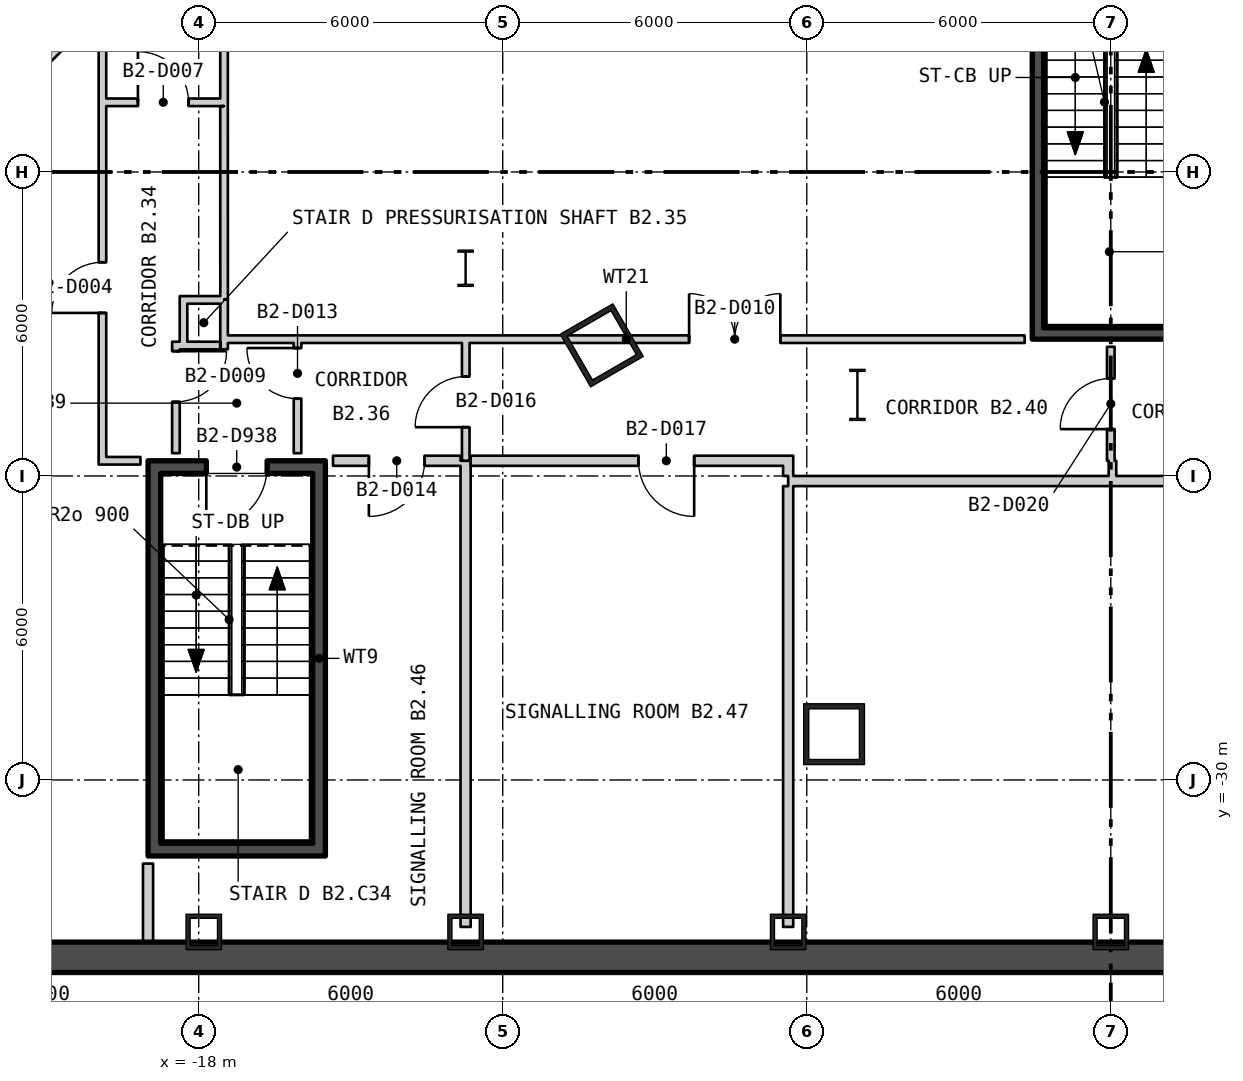
"""IFC4 building model, lengths in metres.
Left out: names, types, materials, properties, quantities, classifications, styles, units other than length and angle.
Written with IfcOpenShell. Run it as: python <this file> out.ifc"""

import sys

from ifc_helpers import new_model, si_unit, direction, frame, frame_2d, origin, origin_2d, place, context, subcontext, project, spatial, rectangle, hollow_rectangle, i_section, extrude, element, fill, save


model = new_model("IFC4")
c1 = context("Model", 3, precision=1e-05, world=origin(), true_north=direction((0.0, 1.0)))
c2 = subcontext(c1, "Body", "Model", "MODEL_VIEW")
j1 = project(units=[si_unit("LENGTHUNIT", "METRE"), si_unit("PLANEANGLEUNIT", "RADIAN")], contexts=[c1])
p1 = place(None, origin())
s1 = spatial("IfcSite", under=j1, at=p1, CompositionType="ELEMENT")
p2 = place(p1, origin())
s2 = spatial("IfcBuilding", under=s1, at=p2, CompositionType="ELEMENT")
p3 = place(p2, frame((0.0, 0.0, -11.4)))
s3 = spatial("IfcBuildingStorey", under=s2, at=p3, CompositionType="ELEMENT", Elevation=-11.4)
for number, where, z_axis, x_axis in (
    (1, (-10.046, -21.422, 0.0), (0.0, 0.0, 1.0), (0.5, -0.866, 0.0)),
    (2, (-5.461, -29.096, 0.0), (0.0, 0.0, 1.0), (1.0, 0.0, 0.0)),
):
    element("IfcColumn", number, at=place(p3, frame(where, z_axis=z_axis, x_axis=x_axis)), inside=s3, PredefinedType="COLUMN", context=c2, shape_type="SweptSolid", body=[
        extrude(hollow_rectangle(XDim=1.2, YDim=1.2, WallThickness=0.1, at=origin_2d()), origin(), (0.0, 0.0, 1.0), 5.7),
    ])
p4 = place(p3, frame((-5.0, -22.4, 0.0), z_axis=(0.0, 0.0, 1.0), x_axis=(1.0, 0.0, 0.0)))
e3 = element("IfcColumn", 3, at=p4, inside=s3, PredefinedType="COLUMN", context=c2, shape_type="SweptSolid", body=[
    extrude(i_section(OverallWidth=0.302, OverallDepth=1.008, WebThickness=0.021, FlangeThickness=0.04, at=origin_2d()), origin(), (0.0, 0.0, 1.0), 5.7),
])
for number, where, z_axis, x_axis in (
    (4, (-17.9, -33.0, 0.0), (0.0, 0.0, 1.0), (1.0, 0.0, 0.0)),
    (5, (-12.733, -33.0, 0.0), (0.0, 0.0, 1.0), (1.0, 0.0, 0.0)),
    (6, (-6.367, -33.0, 0.0), (0.0, 0.0, 1.0), (1.0, 0.0, 0.0)),
    (7, (0.0, -33.0, 0.0), (0.0, 0.0, 1.0), (1.0, 0.0, 0.0)),
):
    element("IfcColumn", number, at=place(p3, frame(where, z_axis=z_axis, x_axis=x_axis)), inside=s3, PredefinedType="COLUMN", context=c2, shape_type="SweptSolid", body=[
        extrude(hollow_rectangle(XDim=0.7, YDim=0.7, WallThickness=0.08, at=origin_2d()), origin(), (0.0, 0.0, 1.0), 5.7),
    ])
p5 = place(p3, frame((-12.733, -19.9, 0.0), z_axis=(0.0, 0.0, 1.0), x_axis=(1.0, 0.0, 0.0)))
e8 = element("IfcColumn", 8, at=p5, inside=s3, PredefinedType="COLUMN", context=c2, shape_type="SweptSolid", body=[
    extrude(i_section(OverallWidth=0.304, OverallDepth=0.716, WebThickness=0.021, FlangeThickness=0.04, at=origin_2d()), origin(), (0.0, 0.0, 1.0), 5.7),
])
p6 = place(p3, frame((-39.0, -33.5, -0.4), z_axis=(0.0, 0.0, 1.0), x_axis=(1.0, 0.0, 0.0)))
e9 = element("IfcWall", 9, at=p6, inside=s3, PredefinedType="STANDARD", context=c2, shape_type="SweptSolid", body=[
    extrude(rectangle(XDim=78.0, YDim=0.6, at=frame_2d((39.0, 0.0))), origin(), (0.0, 0.0, 1.0), 5.7),
])
p7 = place(p3, frame((-1.438, -21.075, 0.0), z_axis=(0.0, 0.0, 1.0), x_axis=(0.0, 1.0, 0.0)))
e10 = element("IfcWall", 10, at=p7, inside=s3, PredefinedType="SHEAR", context=c2, shape_type="SweptSolid", body=[
    extrude(rectangle(XDim=7.25, YDim=0.225, at=frame_2d((3.625, 0.0))), origin(), (0.0, 0.0, 1.0), 5.25),
])
p8 = place(p3, frame((-1.55, -21.188, 0.0), z_axis=(0.0, 0.0, 1.0), x_axis=(1.0, 0.0, 0.0)))
e11 = element("IfcWall", 11, at=p8, inside=s3, PredefinedType="SHEAR", context=c2, shape_type="SweptSolid", body=[
    extrude(rectangle(XDim=3.1, YDim=0.225, at=frame_2d((1.55, 0.0))), origin(), (0.0, 0.0, 1.0), 5.25),
])
for number, where, z_axis, x_axis in (
    (12, (-18.875, -31.25, 0.0), (0.0, 0.0, 1.0), (0.0, 1.0, 0.0)),
    (13, (-15.625, -31.25, 0.0), (0.0, 0.0, 1.0), (0.0, 1.0, 0.0)),
):
    element("IfcWall", number, at=place(p3, frame(where, z_axis=z_axis, x_axis=x_axis)), inside=s3, PredefinedType="SHEAR", context=c2, shape_type="SweptSolid", body=[
        extrude(rectangle(XDim=7.3, YDim=0.25, at=frame_2d((3.65, 0.0))), origin(), (0.0, 0.0, 1.0), 5.25),
    ])
p9 = place(p3, frame((-19.0, -31.375, 0.0), z_axis=(0.0, 0.0, 1.0), x_axis=(1.0, 0.0, 0.0)))
e14 = element("IfcWall", 14, at=p9, inside=s3, PredefinedType="SHEAR", context=c2, shape_type="SweptSolid", body=[
    extrude(rectangle(XDim=3.5, YDim=0.25, at=frame_2d((1.75, 0.0))), origin(), (0.0, 0.0, 1.0), 5.25),
])
p10 = place(p3, frame((-19.0, -23.825, 0.0), z_axis=(0.0, 0.0, 1.0), x_axis=(1.0, 0.0, 0.0)))
e15 = element("IfcWall", 15, at=p10, inside=s3, PredefinedType="SHEAR", context=c2, shape_type="SweptSolid", body=[
    extrude(rectangle(XDim=3.5, YDim=0.25, at=frame_2d((1.75, 0.0))), origin(), (0.0, 0.0, 1.0), 5.25),
])
p11 = place(p10, frame((1.15, 0.0, 0.0)))
e16 = element("IfcOpeningElement", 16, at=p11, cuts=e15, PredefinedType="OPENING", context=c2, shape_type="SweptSolid", body=[
    extrude(rectangle(XDim=1.2, YDim=2.1, at=frame_2d((0.6, 1.05))), frame((0.0, 0.135, 0.0), z_axis=(0.0, -1.0, 0.0), x_axis=(1.0, 0.0, 0.0)), (0.0, 0.0, 1.0), 0.27),
])
p12 = place(p3, frame((-25.026, -19.825, 0.0), z_axis=(0.0, 0.0, 1.0), x_axis=(0.707106781187, 0.707106781187, 0.0)))
e17 = element("IfcWall", 17, at=p12, inside=s3, PredefinedType="PARTITIONING", context=c2, shape_type="SweptSolid", body=[
    extrude(rectangle(XDim=7.068, YDim=0.15, at=frame_2d((3.534, 0.0))), origin(), (0.0, 0.0, 1.0), 5.25),
])
p13 = place(p3, frame((-19.9, -23.775, 0.0), z_axis=(0.0, 0.0, 1.0), x_axis=(0.0, 1.0, 0.0)))
e18 = element("IfcWall", 18, at=p13, inside=s3, PredefinedType="PARTITIONING", context=c2, shape_type="SweptSolid", body=[
    extrude(rectangle(XDim=21.187, YDim=0.15, at=frame_2d((10.594, 0.0))), origin(), (0.0, 0.0, 1.0), 5.25),
])
p14 = place(p13, frame((2.993, 0.0, 0.0)))
e19 = element("IfcOpeningElement", 19, at=p14, cuts=e18, PredefinedType="OPENING", context=c2, shape_type="SweptSolid", body=[
    extrude(rectangle(XDim=1.0, YDim=2.1, at=frame_2d((0.5, 1.05))), frame((0.0, 0.085, 0.0), z_axis=(0.0, -1.0, 0.0), x_axis=(1.0, 0.0, 0.0)), (0.0, 0.0, 1.0), 0.17),
])
p15 = place(p13, frame((12.399, 0.0, 0.0)))
e20 = element("IfcOpeningElement", 20, at=p15, cuts=e18, PredefinedType="OPENING", context=c2, shape_type="SweptSolid", body=[
    extrude(rectangle(XDim=1.0, YDim=2.1, at=frame_2d((0.5, 1.05))), frame((0.0, 0.085, 0.0), z_axis=(0.0, -1.0, 0.0), x_axis=(1.0, 0.0, 0.0)), (0.0, 0.0, 1.0), 0.17),
])
p16 = place(p3, frame((-19.825, -23.7, 0.0), z_axis=(0.0, 0.0, 1.0), x_axis=(1.0, 0.0, 0.0)))
e21 = element("IfcWall", 21, at=p16, inside=s3, PredefinedType="PARTITIONING", context=c2, shape_type="SweptSolid", body=[
    extrude(rectangle(XDim=0.675, YDim=0.15, at=frame_2d((0.338, 0.0))), origin(), (0.0, 0.0, 1.0), 5.25),
])
p17 = place(p3, frame((-19.825, -16.625, 0.0), z_axis=(0.0, 0.0, 1.0), x_axis=(1.0, 0.0, 0.0)))
e22 = element("IfcWall", 22, at=p17, inside=s3, PredefinedType="PARTITIONING", context=c2, shape_type="SweptSolid", body=[
    extrude(rectangle(XDim=2.25, YDim=0.15, at=frame_2d((1.125, 0.0))), origin(), (0.0, 0.0, 1.0), 5.25),
])
p18 = place(p17, frame((0.625, 0.0, 0.0)))
e23 = element("IfcOpeningElement", 23, at=p18, cuts=e22, PredefinedType="OPENING", context=c2, shape_type="SweptSolid", body=[
    extrude(rectangle(XDim=1.0, YDim=2.1, at=frame_2d((0.5, 1.05))), frame((0.0, 0.085, 0.0), z_axis=(0.0, -1.0, 0.0), x_axis=(1.0, 0.0, 0.0)), (0.0, 0.0, 1.0), 0.17),
])
p19 = place(p3, frame((-19.0, -33.348, 0.0), z_axis=(0.0, 0.0, 1.0), x_axis=(0.0, 1.0, 0.0)))
e24 = element("IfcWall", 24, at=p19, inside=s3, PredefinedType="PARTITIONING", context=c2, shape_type="SweptSolid", body=[
    extrude(rectangle(XDim=1.698, YDim=0.2, at=frame_2d((0.849, 0.0))), origin(), (0.0, 0.0, 1.0), 5.25),
])
p20 = place(p3, frame((-18.45, -23.55, 0.0), z_axis=(0.0, 0.0, 1.0), x_axis=(0.0, 1.0, 0.0)))
e25 = element("IfcWall", 25, at=p20, inside=s3, PredefinedType="PARTITIONING", context=c2, shape_type="SweptSolid", body=[
    extrude(rectangle(XDim=2.2, YDim=0.15, at=frame_2d((1.1, 0.0))), origin(), (0.0, 0.0, 1.0), 5.25),
])
p21 = place(p20, frame((1.013, 0.0, 0.0)))
e26 = element("IfcOpeningElement", 26, at=p21, cuts=e25, PredefinedType="OPENING", context=c2, shape_type="SweptSolid", body=[
    extrude(rectangle(XDim=1.0, YDim=2.1, at=frame_2d((0.5, 1.05))), frame((0.0, 0.085, 0.0), z_axis=(0.0, -1.0, 0.0), x_axis=(1.0, 0.0, 0.0)), (0.0, 0.0, 1.0), 0.17),
])
p22 = place(p3, frame((-18.3, -21.5, 0.0), z_axis=(0.0, 0.0, 1.0), x_axis=(0.0, 1.0, 0.0)))
e27 = element("IfcWall", 27, at=p22, inside=s3, PredefinedType="PARTITIONING", context=c2, shape_type="SweptSolid", body=[
    extrude(rectangle(XDim=1.05, YDim=0.15, at=frame_2d((0.525, 0.0))), origin(), (0.0, 0.0, 1.0), 5.25),
])
p23 = place(p3, frame((-18.225, -21.425, 0.0), z_axis=(0.0, 0.0, 1.0), x_axis=(1.0, 0.0, 0.0)))
e28 = element("IfcWall", 28, at=p23, inside=s3, PredefinedType="PARTITIONING", context=c2, shape_type="SweptSolid", body=[
    extrude(rectangle(XDim=0.65, YDim=0.15, at=frame_2d((0.325, 0.0))), origin(), (0.0, 0.0, 1.0), 5.25),
])
p24 = place(p3, frame((-18.225, -20.525, 0.0), z_axis=(0.0, 0.0, 1.0), x_axis=(1.0, 0.0, 0.0)))
e29 = element("IfcWall", 29, at=p24, inside=s3, PredefinedType="PARTITIONING", context=c2, shape_type="SweptSolid", body=[
    extrude(rectangle(XDim=0.651, YDim=0.15, at=frame_2d((0.326, 0.0))), origin(), (0.0, 0.0, 1.0), 5.25),
])
p25 = place(p3, frame((-17.5, -21.5, 0.0), z_axis=(0.0, 0.0, 1.0), x_axis=(0.001013170706, 0.999999486742, 0.0)))
e30 = element("IfcWall", 30, at=p25, inside=s3, PredefinedType="PARTITIONING", context=c2, shape_type="SweptSolid", body=[
    extrude(rectangle(XDim=0.987, YDim=0.15, at=frame_2d((0.493, 0.0))), origin(), (0.0, 0.0, 1.0), 5.25),
])
p26 = place(p3, frame((-17.5, -16.7, 0.0), z_axis=(0.0, 0.0, 1.0), x_axis=(0.0, 1.0, 0.0)))
e31 = element("IfcWall", 31, at=p26, inside=s3, PredefinedType="PARTITIONING", context=c2, shape_type="SweptSolid", body=[
    extrude(rectangle(XDim=4.475, YDim=0.15, at=frame_2d((2.237, 0.0))), origin(), (0.0, 0.0, 1.0), 5.25),
])
p27 = place(p3, frame((-17.5, -16.7, 0.0), z_axis=(0.0, 0.0, 1.0), x_axis=(0.000262260678, -0.99999996561, 0.0)))
e32 = element("IfcWall", 32, at=p27, inside=s3, PredefinedType="PARTITIONING", context=c2, shape_type="SweptSolid", body=[
    extrude(rectangle(XDim=3.813, YDim=0.15, at=frame_2d((1.907, 0.0))), origin(), (0.0, 0.0, 1.0), 5.25),
])
p28 = place(p3, frame((-17.425, -21.3, 0.0), z_axis=(0.0, 0.0, 1.0), x_axis=(1.0, 0.0, 0.0)))
e33 = element("IfcWall", 33, at=p28, inside=s3, PredefinedType="PARTITIONING", context=c2, shape_type="SweptSolid", body=[
    extrude(rectangle(XDim=15.725, YDim=0.15, at=frame_2d((7.862, 0.0))), origin(), (0.0, 0.0, 1.0), 5.25),
])
p29 = place(p28, frame((9.103, 0.0, 0.0)))
e34 = element("IfcOpeningElement", 34, at=p29, cuts=e33, PredefinedType="OPENING", context=c2, shape_type="SweptSolid", body=[
    extrude(rectangle(XDim=1.8, YDim=2.1, at=frame_2d((0.9, 1.05))), frame((0.0, 0.085, 0.0), z_axis=(0.0, -1.0, 0.0), x_axis=(1.0, 0.0, 0.0)), (0.0, 0.0, 1.0), 0.17),
])
p30 = place(p3, frame((-16.05, -23.55, 0.0), z_axis=(0.0, 0.0, 1.0), x_axis=(0.0, 1.0, 0.0)))
e35 = element("IfcWall", 35, at=p30, inside=s3, PredefinedType="PARTITIONING", context=c2, shape_type="SweptSolid", body=[
    extrude(rectangle(XDim=2.175, YDim=0.15, at=frame_2d((1.087, 0.0))), origin(), (0.0, 0.0, 1.0), 5.25),
])
p31 = place(p30, frame((1.075, 0.0, 0.0)))
e36 = element("IfcOpeningElement", 36, at=p31, cuts=e35, PredefinedType="OPENING", context=c2, shape_type="SweptSolid", body=[
    extrude(rectangle(XDim=1.0, YDim=2.1, at=frame_2d((0.5, 1.05))), frame((0.0, 0.085, 0.0), z_axis=(0.0, -1.0, 0.0), x_axis=(1.0, 0.0, 0.0)), (0.0, 0.0, 1.0), 0.17),
])
p32 = place(p3, frame((-15.35, -23.7, 0.0), z_axis=(0.0, 0.0, 1.0), x_axis=(1.0, 0.0, 0.0)))
e37 = element("IfcWall", 37, at=p32, inside=s3, PredefinedType="PARTITIONING", context=c2, shape_type="SweptSolid", body=[
    extrude(rectangle(XDim=2.517, YDim=0.2, at=frame_2d((1.258, 0.0))), origin(), (0.0, 0.0, 1.0), 5.25),
])
p33 = place(p32, frame((0.708, 0.0, 0.0)))
e38 = element("IfcOpeningElement", 38, at=p33, cuts=e37, PredefinedType="OPENING", context=c2, shape_type="SweptSolid", body=[
    extrude(rectangle(XDim=1.1, YDim=2.1, at=frame_2d((0.55, 1.05))), frame((0.0, 0.11, 0.0), z_axis=(0.0, -1.0, 0.0), x_axis=(1.0, 0.0, 0.0)), (0.0, 0.0, 1.0), 0.22),
])
p34 = place(p3, frame((-12.733, -32.9, 0.0), z_axis=(0.0, 0.0, 1.0), x_axis=(0.0, 1.0, 0.0)))
e39 = element("IfcWall", 39, at=p34, inside=s3, PredefinedType="PARTITIONING", context=c2, shape_type="SweptSolid", body=[
    extrude(rectangle(XDim=9.2, YDim=0.2, at=frame_2d((4.6, 0.0))), origin(), (0.0, 0.0, 1.0), 5.25),
])
p35 = place(p3, frame((-12.73, -23.699, 0.0), z_axis=(0.0, 0.0, 1.0), x_axis=(0.0, 1.0, 0.0)))
e40 = element("IfcWall", 40, at=p35, inside=s3, PredefinedType="PARTITIONING", context=c2, shape_type="SweptSolid", body=[
    extrude(rectangle(XDim=2.324, YDim=0.15, at=frame_2d((1.162, 0.0))), origin(), (0.0, 0.0, 1.0), 5.25),
])
p36 = place(p35, frame((0.662, 0.0, 0.0)))
e41 = element("IfcOpeningElement", 41, at=p36, cuts=e40, PredefinedType="OPENING", context=c2, shape_type="SweptSolid", body=[
    extrude(rectangle(XDim=1.0, YDim=2.1, at=frame_2d((0.5, 1.05))), frame((0.0, 0.085, 0.0), z_axis=(0.0, -1.0, 0.0), x_axis=(1.0, 0.0, 0.0)), (0.0, 0.0, 1.0), 0.17),
])
p37 = place(p3, frame((-12.633, -23.7, 0.0), z_axis=(0.0, 0.0, 1.0), x_axis=(1.0, 0.0, 0.0)))
e42 = element("IfcWall", 42, at=p37, inside=s3, PredefinedType="PARTITIONING", context=c2, shape_type="SweptSolid", body=[
    extrude(rectangle(XDim=6.166, YDim=0.2, at=frame_2d((3.083, 0.0))), origin(), (0.0, 0.0, 1.0), 5.25),
])
p38 = place(p37, frame((3.311, 0.0, 0.0)))
e43 = element("IfcOpeningElement", 43, at=p38, cuts=e42, PredefinedType="OPENING", context=c2, shape_type="SweptSolid", body=[
    extrude(rectangle(XDim=1.1, YDim=2.1, at=frame_2d((0.55, 1.05))), frame((0.0, 0.11, 0.0), z_axis=(0.0, -1.0, 0.0), x_axis=(1.0, 0.0, 0.0)), (0.0, 0.0, 1.0), 0.22),
])
p39 = place(p3, frame((-6.367, -32.9, 0.0), z_axis=(0.0, 0.0, 1.0), x_axis=(0.0, 1.0, 0.0)))
e44 = element("IfcWall", 44, at=p39, inside=s3, PredefinedType="PARTITIONING", context=c2, shape_type="SweptSolid", body=[
    extrude(rectangle(XDim=8.7, YDim=0.2, at=frame_2d((4.35, 0.0))), origin(), (0.0, 0.0, 1.0), 5.25),
])
p40 = place(p3, frame((-6.367, -24.1, 0.0), z_axis=(0.0, 0.0, 1.0), x_axis=(1.0, 0.0, 0.0)))
e45 = element("IfcWall", 45, at=p40, inside=s3, PredefinedType="PARTITIONING", context=c2, shape_type="SweptSolid", body=[
    extrude(rectangle(XDim=19.1, YDim=0.2, at=frame_2d((9.55, 0.0))), origin(), (0.0, 0.0, 1.0), 5.25),
])
p41 = place(p40, frame((16.944, 0.0, 0.0)))
e46 = element("IfcOpeningElement", 46, at=p41, cuts=e45, PredefinedType="OPENING", context=c2, shape_type="SweptSolid", body=[
    extrude(rectangle(XDim=1.1, YDim=2.1, at=frame_2d((0.55, 1.05))), frame((0.0, 0.11, 0.0), z_axis=(0.0, -1.0, 0.0), x_axis=(1.0, 0.0, 0.0)), (0.0, 0.0, 1.0), 0.22),
])
p42 = place(p3, frame((-6.367, -24.0, 0.0), z_axis=(0.0, 0.0, 1.0), x_axis=(0.0, 1.0, 0.0)))
e47 = element("IfcWall", 47, at=p42, inside=s3, PredefinedType="PARTITIONING", context=c2, shape_type="SweptSolid", body=[
    extrude(rectangle(XDim=0.4, YDim=0.2, at=frame_2d((0.2, 0.0))), origin(), (0.0, 0.0, 1.0), 5.25),
])
p43 = place(p3, frame((0.0, -23.7, 0.0), z_axis=(0.0, 0.0, 1.0), x_axis=(0.0, 1.0, 0.0)))
e48 = element("IfcWall", 48, at=p43, inside=s3, PredefinedType="PARTITIONING", context=c2, shape_type="SweptSolid", body=[
    extrude(rectangle(XDim=2.25, YDim=0.15, at=frame_2d((1.125, 0.0))), origin(), (0.0, 0.0, 1.0), 5.25),
])
p44 = place(p43, frame((0.625, 0.0, 0.0)))
e49 = element("IfcOpeningElement", 49, at=p44, cuts=e48, PredefinedType="OPENING", context=c2, shape_type="SweptSolid", body=[
    extrude(rectangle(XDim=1.0, YDim=2.1, at=frame_2d((0.5, 1.05))), frame((0.0, 0.085, 0.0), z_axis=(0.0, -1.0, 0.0), x_axis=(1.0, 0.0, 0.0)), (0.0, 0.0, 1.0), 0.17),
])
p45 = place(p3, frame((0.033, -24.0, 0.0), z_axis=(0.0, 0.0, 1.0), x_axis=(0.0, 1.0, 0.0)))
e50 = element("IfcWall", 50, at=p45, inside=s3, PredefinedType="PARTITIONING", context=c2, shape_type="SweptSolid", body=[
    extrude(rectangle(XDim=0.3, YDim=0.15, at=frame_2d((0.15, 0.0))), origin(), (0.0, 0.0, 1.0), 5.25),
])
p46 = place(p11, origin())
e51 = element("IfcDoor", 51, at=p46, inside=s3, OperationType="SINGLE_SWING_LEFT", PredefinedType="DOOR", context=c2, shape_type="SweptSolid", body=[
    extrude(rectangle(XDim=1.2, YDim=2.1, at=frame_2d((0.6, 1.05))), frame((0.0, 0.025, 0.0), z_axis=(0.0, -1.0, 0.0), x_axis=(1.0, 0.0, 0.0)), (0.0, 0.0, 1.0), 0.05),
])
fill(e16, e51)
p47 = place(p14, origin())
e52 = element("IfcDoor", 52, at=p47, inside=s3, OperationType="SINGLE_SWING_RIGHT", PredefinedType="DOOR", context=c2, shape_type="SweptSolid", body=[
    extrude(rectangle(XDim=1.0, YDim=2.1, at=frame_2d((0.5, 1.05))), frame((0.0, 0.025, 0.0), z_axis=(0.0, -1.0, 0.0), x_axis=(1.0, 0.0, 0.0)), (0.0, 0.0, 1.0), 0.05),
])
fill(e19, e52)
p48 = place(p18, origin())
e53 = element("IfcDoor", 53, at=p48, inside=s3, OperationType="SINGLE_SWING_RIGHT", PredefinedType="DOOR", context=c2, shape_type="SweptSolid", body=[
    extrude(rectangle(XDim=1.0, YDim=2.1, at=frame_2d((0.5, 1.05))), frame((0.0, 0.025, 0.0), z_axis=(0.0, -1.0, 0.0), x_axis=(1.0, 0.0, 0.0)), (0.0, 0.0, 1.0), 0.05),
])
fill(e23, e53)
p49 = place(p21, origin())
e54 = element("IfcDoor", 54, at=p49, inside=s3, OperationType="SINGLE_SWING_RIGHT", PredefinedType="DOOR", context=c2, shape_type="SweptSolid", body=[
    extrude(rectangle(XDim=1.0, YDim=2.1, at=frame_2d((0.5, 1.05))), frame((0.0, 0.025, 0.0), z_axis=(0.0, -1.0, 0.0), x_axis=(1.0, 0.0, 0.0)), (0.0, 0.0, 1.0), 0.05),
])
fill(e26, e54)
p50 = place(p29, origin())
e55 = element("IfcDoor", 55, at=p50, inside=s3, OperationType="DOUBLE_DOOR_SINGLE_SWING", PredefinedType="DOOR", context=c2, shape_type="SweptSolid", body=[
    extrude(rectangle(XDim=1.8, YDim=2.1, at=frame_2d((0.9, 1.05))), frame((0.0, 0.025, 0.0), z_axis=(0.0, -1.0, 0.0), x_axis=(1.0, 0.0, 0.0)), (0.0, 0.0, 1.0), 0.05),
])
fill(e34, e55)
p51 = place(p31, origin())
e56 = element("IfcDoor", 56, at=p51, inside=s3, OperationType="SINGLE_SWING_LEFT", PredefinedType="DOOR", context=c2, shape_type="SweptSolid", body=[
    extrude(rectangle(XDim=1.0, YDim=2.1, at=frame_2d((0.5, 1.05))), frame((0.0, 0.025, 0.0), z_axis=(0.0, -1.0, 0.0), x_axis=(1.0, 0.0, 0.0)), (0.0, 0.0, 1.0), 0.05),
])
fill(e36, e56)
p52 = place(p33, origin())
e57 = element("IfcDoor", 57, at=p52, inside=s3, OperationType="SINGLE_SWING_LEFT", PredefinedType="DOOR", context=c2, shape_type="SweptSolid", body=[
    extrude(rectangle(XDim=1.1, YDim=2.1, at=frame_2d((0.55, 1.05))), frame((0.0, 0.025, 0.0), z_axis=(0.0, -1.0, 0.0), x_axis=(1.0, 0.0, 0.0)), (0.0, 0.0, 1.0), 0.05),
])
fill(e38, e57)
p53 = place(p36, origin())
e58 = element("IfcDoor", 58, at=p53, inside=s3, OperationType="SINGLE_SWING_RIGHT", PredefinedType="DOOR", context=c2, shape_type="SweptSolid", body=[
    extrude(rectangle(XDim=1.0, YDim=2.1, at=frame_2d((0.5, 1.05))), frame((0.0, 0.025, 0.0), z_axis=(0.0, -1.0, 0.0), x_axis=(1.0, 0.0, 0.0)), (0.0, 0.0, 1.0), 0.05),
])
fill(e41, e58)
p54 = place(p38, origin())
e59 = element("IfcDoor", 59, at=p54, inside=s3, OperationType="SINGLE_SWING_RIGHT", PredefinedType="DOOR", context=c2, shape_type="SweptSolid", body=[
    extrude(rectangle(XDim=1.1, YDim=2.1, at=frame_2d((0.55, 1.05))), frame((0.0, 0.025, 0.0), z_axis=(0.0, -1.0, 0.0), x_axis=(1.0, 0.0, 0.0)), (0.0, 0.0, 1.0), 0.05),
])
fill(e43, e59)
p55 = place(p44, origin())
e60 = element("IfcDoor", 60, at=p55, inside=s3, OperationType="SINGLE_SWING_RIGHT", PredefinedType="DOOR", context=c2, shape_type="SweptSolid", body=[
    extrude(rectangle(XDim=1.0, YDim=2.1, at=frame_2d((0.5, 1.05))), frame((0.0, 0.025, 0.0), z_axis=(0.0, -1.0, 0.0), x_axis=(1.0, 0.0, 0.0)), (0.0, 0.0, 1.0), 0.05),
])
fill(e49, e60)
save(model, sys.argv[1])
